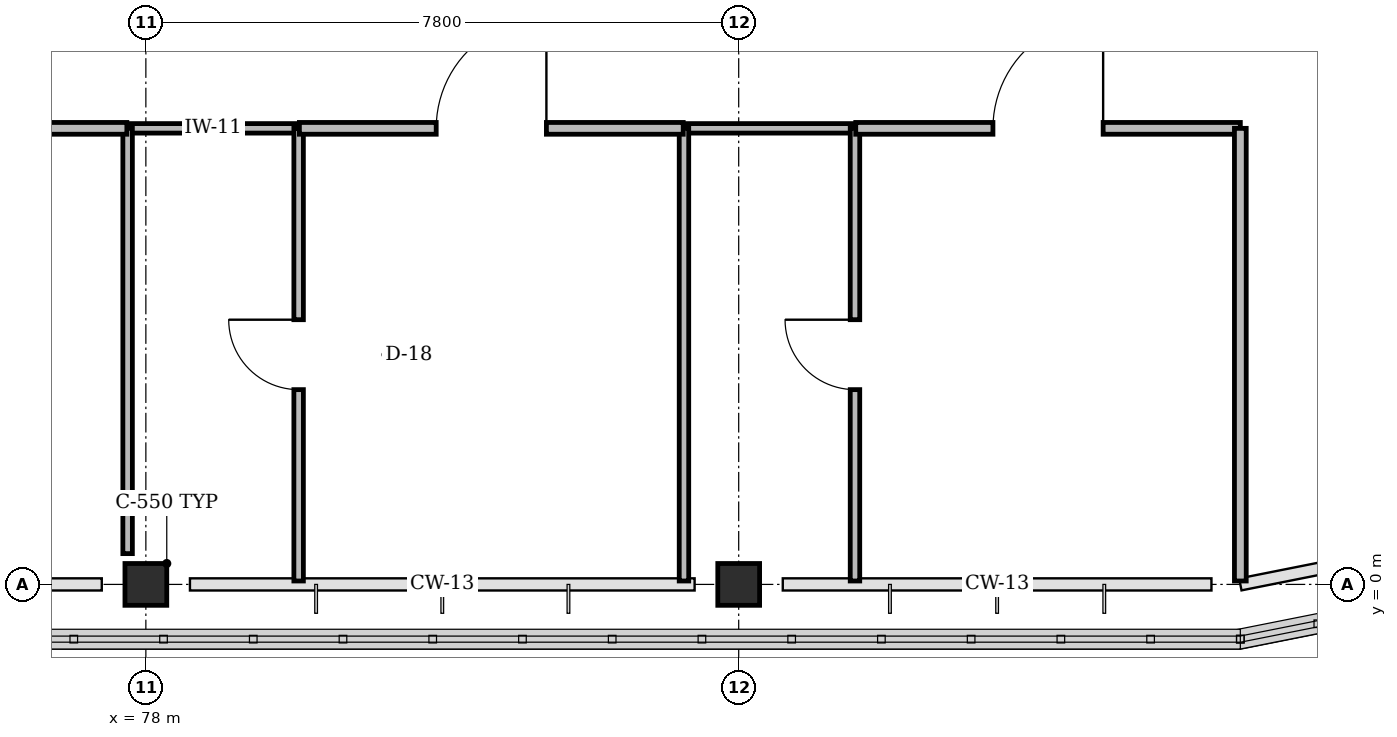
"""IFC4 building model, lengths in metres.
Left out: names, types, materials, properties, quantities, classifications, styles, units other than length and angle.
Written with IfcOpenShell. Run it as: python <this file> out.ifc"""

import sys

from ifc_helpers import new_model, si_unit, direction, frame, frame_2d, origin, origin_2d, place, context, subcontext, project, spatial, rectangle, extrude, element, fill, save


model = new_model("IFC4")
c1 = context("Model", 3, precision=1e-05, world=origin(), true_north=direction((0.0, 1.0)))
c2 = subcontext(c1, "Body", "Model", "MODEL_VIEW")
j1 = project(units=[si_unit("LENGTHUNIT", "METRE"), si_unit("PLANEANGLEUNIT", "RADIAN")], contexts=[c1])
p1 = place(None, origin())
s1 = spatial("IfcSite", under=j1, at=p1, CompositionType="ELEMENT")
p2 = place(p1, origin())
s2 = spatial("IfcBuilding", under=s1, at=p2, CompositionType="ELEMENT")
p3 = place(p2, frame((0.0, 0.0, 39.0)))
s3 = spatial("IfcBuildingStorey", under=s2, at=p3, CompositionType="ELEMENT", Elevation=39.0)
for number, where, z_axis, x_axis in (
    (1, (78.0, 0.0, 0.0), (0.0, 0.0, 1.0), (1.0, 0.0, 0.0)),
    (2, (85.8, 0.0, 0.0), (0.0, 0.0, 1.0), (1.0, 0.0, 0.0)),
):
    element("IfcColumn", number, at=place(p3, frame(where, z_axis=z_axis, x_axis=x_axis)), inside=s3, PredefinedType="COLUMN", context=c2, shape_type="SweptSolid", body=[
        extrude(rectangle(XDim=0.55, YDim=0.55, at=origin_2d()), origin(), (0.0, 0.0, 1.0), 4.2),
    ])
p4 = place(p3, frame((77.76, 6.0, 0.0), z_axis=(0.0, 0.0, 1.0), x_axis=(1.0, 0.0, 0.0)))
e3 = element("IfcWall", 3, at=p4, inside=s3, PredefinedType="PARTITIONING", context=c2, shape_type="SweptSolid", body=[
    extrude(rectangle(XDim=2.25, YDim=0.125, at=frame_2d((1.125, 0.0))), origin(), (0.0, 0.0, 1.0), 3.9),
])
p5 = place(p3, frame((77.76, 0.405, 0.0), z_axis=(0.0, 0.0, 1.0), x_axis=(0.0, 1.0, 0.0)))
e4 = element("IfcWall", 4, at=p5, inside=s3, PredefinedType="PARTITIONING", context=c2, shape_type="SweptSolid", body=[
    extrude(rectangle(XDim=5.595, YDim=0.125, at=frame_2d((2.797, 0.0))), origin(), (0.0, 0.0, 1.0), 3.355),
])
p6 = place(p3, frame((80.01, 0.045, 0.0), z_axis=(0.0, 0.0, 1.0), x_axis=(0.0, 1.0, 0.0)))
e5 = element("IfcWall", 5, at=p6, inside=s3, PredefinedType="PARTITIONING", context=c2, shape_type="SweptSolid", body=[
    extrude(rectangle(XDim=5.955, YDim=0.125, at=frame_2d((2.978, 0.0))), origin(), (0.0, 0.0, 1.0), 3.9),
])
p7 = place(p6, frame((2.518, 0.0, 0.0)))
e6 = element("IfcOpeningElement", 6, at=p7, cuts=e5, PredefinedType="OPENING", context=c2, shape_type="SweptSolid", body=[
    extrude(rectangle(XDim=0.92, YDim=2.1, at=frame_2d((0.46, 1.05))), frame((0.0, 0.073, 0.0), z_axis=(0.0, -1.0, 0.0), x_axis=(1.0, 0.0, 0.0)), (0.0, 0.0, 1.0), 0.145),
])
p8 = place(p3, frame((85.08, 6.0, 0.0), z_axis=(0.0, 0.0, 1.0), x_axis=(1.0, 0.0, 0.0)))
e7 = element("IfcWall", 7, at=p8, inside=s3, PredefinedType="PARTITIONING", context=c2, shape_type="SweptSolid", body=[
    extrude(rectangle(XDim=2.25, YDim=0.125, at=frame_2d((1.125, 0.0))), origin(), (0.0, 0.0, 1.0), 3.9),
])
p9 = place(p3, frame((85.08, 0.045, 0.0), z_axis=(0.0, 0.0, 1.0), x_axis=(0.0, 1.0, 0.0)))
e8 = element("IfcWall", 8, at=p9, inside=s3, PredefinedType="PARTITIONING", context=c2, shape_type="SweptSolid", body=[
    extrude(rectangle(XDim=5.955, YDim=0.125, at=frame_2d((2.978, 0.0))), origin(), (0.0, 0.0, 1.0), 3.9),
])
p10 = place(p3, frame((87.33, 0.045, 0.0), z_axis=(0.0, 0.0, 1.0), x_axis=(0.0, 1.0, 0.0)))
e9 = element("IfcWall", 9, at=p10, inside=s3, PredefinedType="PARTITIONING", context=c2, shape_type="SweptSolid", body=[
    extrude(rectangle(XDim=5.955, YDim=0.125, at=frame_2d((2.978, 0.0))), origin(), (0.0, 0.0, 1.0), 3.9),
])
p11 = place(p10, frame((2.518, 0.0, 0.0)))
e10 = element("IfcOpeningElement", 10, at=p11, cuts=e9, PredefinedType="OPENING", context=c2, shape_type="SweptSolid", body=[
    extrude(rectangle(XDim=0.92, YDim=2.1, at=frame_2d((0.46, 1.05))), frame((0.0, 0.073, 0.0), z_axis=(0.0, -1.0, 0.0), x_axis=(1.0, 0.0, 0.0)), (0.0, 0.0, 1.0), 0.145),
])
p12 = place(p3, frame((72.7, 6.0, 0.0), z_axis=(0.0, 0.0, 1.0), x_axis=(1.0, 0.0, 0.0)))
e11 = element("IfcWall", 11, at=p12, inside=s3, PredefinedType="PARTITIONING", context=c2, shape_type="SweptSolid", body=[
    extrude(rectangle(XDim=5.05, YDim=0.155, at=frame_2d((2.525, 0.0))), origin(), (0.0, 0.0, 1.0), 3.9),
])
p13 = place(p12, frame((1.8, 0.0, 0.0)))
e12 = element("IfcOpeningElement", 12, at=p13, cuts=e11, PredefinedType="OPENING", context=c2, shape_type="SweptSolid", body=[
    extrude(rectangle(XDim=1.45, YDim=2.2, at=frame_2d((0.725, 1.1))), frame((0.0, 0.087, 0.0), z_axis=(0.0, -1.0, 0.0), x_axis=(1.0, 0.0, 0.0)), (0.0, 0.0, 1.0), 0.175),
])
p14 = place(p3, frame((80.02, 6.0, 0.0), z_axis=(0.0, 0.0, 1.0), x_axis=(1.0, 0.0, 0.0)))
e13 = element("IfcWall", 13, at=p14, inside=s3, PredefinedType="PARTITIONING", context=c2, shape_type="SweptSolid", body=[
    extrude(rectangle(XDim=5.05, YDim=0.155, at=frame_2d((2.525, 0.0))), origin(), (0.0, 0.0, 1.0), 3.9),
])
p15 = place(p14, frame((1.8, 0.0, 0.0)))
e14 = element("IfcOpeningElement", 14, at=p15, cuts=e13, PredefinedType="OPENING", context=c2, shape_type="SweptSolid", body=[
    extrude(rectangle(XDim=1.45, YDim=2.2, at=frame_2d((0.725, 1.1))), frame((0.0, 0.087, 0.0), z_axis=(0.0, -1.0, 0.0), x_axis=(1.0, 0.0, 0.0)), (0.0, 0.0, 1.0), 0.175),
])
p16 = place(p3, frame((87.34, 6.0, 0.0), z_axis=(0.0, 0.0, 1.0), x_axis=(1.0, 0.0, 0.0)))
e15 = element("IfcWall", 15, at=p16, inside=s3, PredefinedType="PARTITIONING", context=c2, shape_type="SweptSolid", body=[
    extrude(rectangle(XDim=5.06, YDim=0.155, at=frame_2d((2.53, 0.0))), origin(), (0.0, 0.0, 1.0), 3.9),
])
p17 = place(p16, frame((1.805, 0.0, 0.0)))
e16 = element("IfcOpeningElement", 16, at=p17, cuts=e15, PredefinedType="OPENING", context=c2, shape_type="SweptSolid", body=[
    extrude(rectangle(XDim=1.45, YDim=2.2, at=frame_2d((0.725, 1.1))), frame((0.0, 0.087, 0.0), z_axis=(0.0, -1.0, 0.0), x_axis=(1.0, 0.0, 0.0)), (0.0, 0.0, 1.0), 0.175),
])
p18 = place(p3, frame((92.4, 0.045, 0.0), z_axis=(0.0, 0.0, 1.0), x_axis=(0.0, 1.0, 0.0)))
e17 = element("IfcWall", 17, at=p18, inside=s3, PredefinedType="PARTITIONING", context=c2, shape_type="SweptSolid", body=[
    extrude(rectangle(XDim=5.955, YDim=0.155, at=frame_2d((2.978, 0.0))), origin(), (0.0, 0.0, 1.0), 3.9),
])
p19 = place(p7, origin())
e18 = element("IfcDoor", 18, at=p19, inside=s3, OperationType="SINGLE_SWING_RIGHT", PredefinedType="DOOR", context=c2, shape_type="SweptSolid", body=[
    extrude(rectangle(XDim=0.92, YDim=2.1, at=frame_2d((0.46, 1.05))), frame((0.0, 0.025, 0.0), z_axis=(0.0, -1.0, 0.0), x_axis=(1.0, 0.0, 0.0)), (0.0, 0.0, 1.0), 0.05),
])
fill(e6, e18)
p20 = place(p11, origin())
e19 = element("IfcDoor", 19, at=p20, inside=s3, OperationType="SINGLE_SWING_RIGHT", PredefinedType="DOOR", context=c2, shape_type="SweptSolid", body=[
    extrude(rectangle(XDim=0.92, YDim=2.1, at=frame_2d((0.46, 1.05))), frame((0.0, 0.025, 0.0), z_axis=(0.0, -1.0, 0.0), x_axis=(1.0, 0.0, 0.0)), (0.0, 0.0, 1.0), 0.05),
])
fill(e10, e19)
p21 = place(p15, origin())
e20 = element("IfcDoor", 20, at=p21, inside=s3, OperationType="SINGLE_SWING_RIGHT", PredefinedType="DOOR", context=c2, shape_type="SweptSolid", body=[
    extrude(rectangle(XDim=1.45, YDim=2.2, at=frame_2d((0.725, 1.1))), frame((0.0, 0.025, 0.0), z_axis=(0.0, -1.0, 0.0), x_axis=(1.0, 0.0, 0.0)), (0.0, 0.0, 1.0), 0.05),
])
fill(e14, e20)
p22 = place(p17, origin())
e21 = element("IfcDoor", 21, at=p22, inside=s3, OperationType="SINGLE_SWING_RIGHT", PredefinedType="DOOR", context=c2, shape_type="SweptSolid", body=[
    extrude(rectangle(XDim=1.45, YDim=2.2, at=frame_2d((0.725, 1.1))), frame((0.0, 0.025, 0.0), z_axis=(0.0, -1.0, 0.0), x_axis=(1.0, 0.0, 0.0)), (0.0, 0.0, 1.0), 0.05),
])
fill(e16, e21)
save(model, sys.argv[1])
